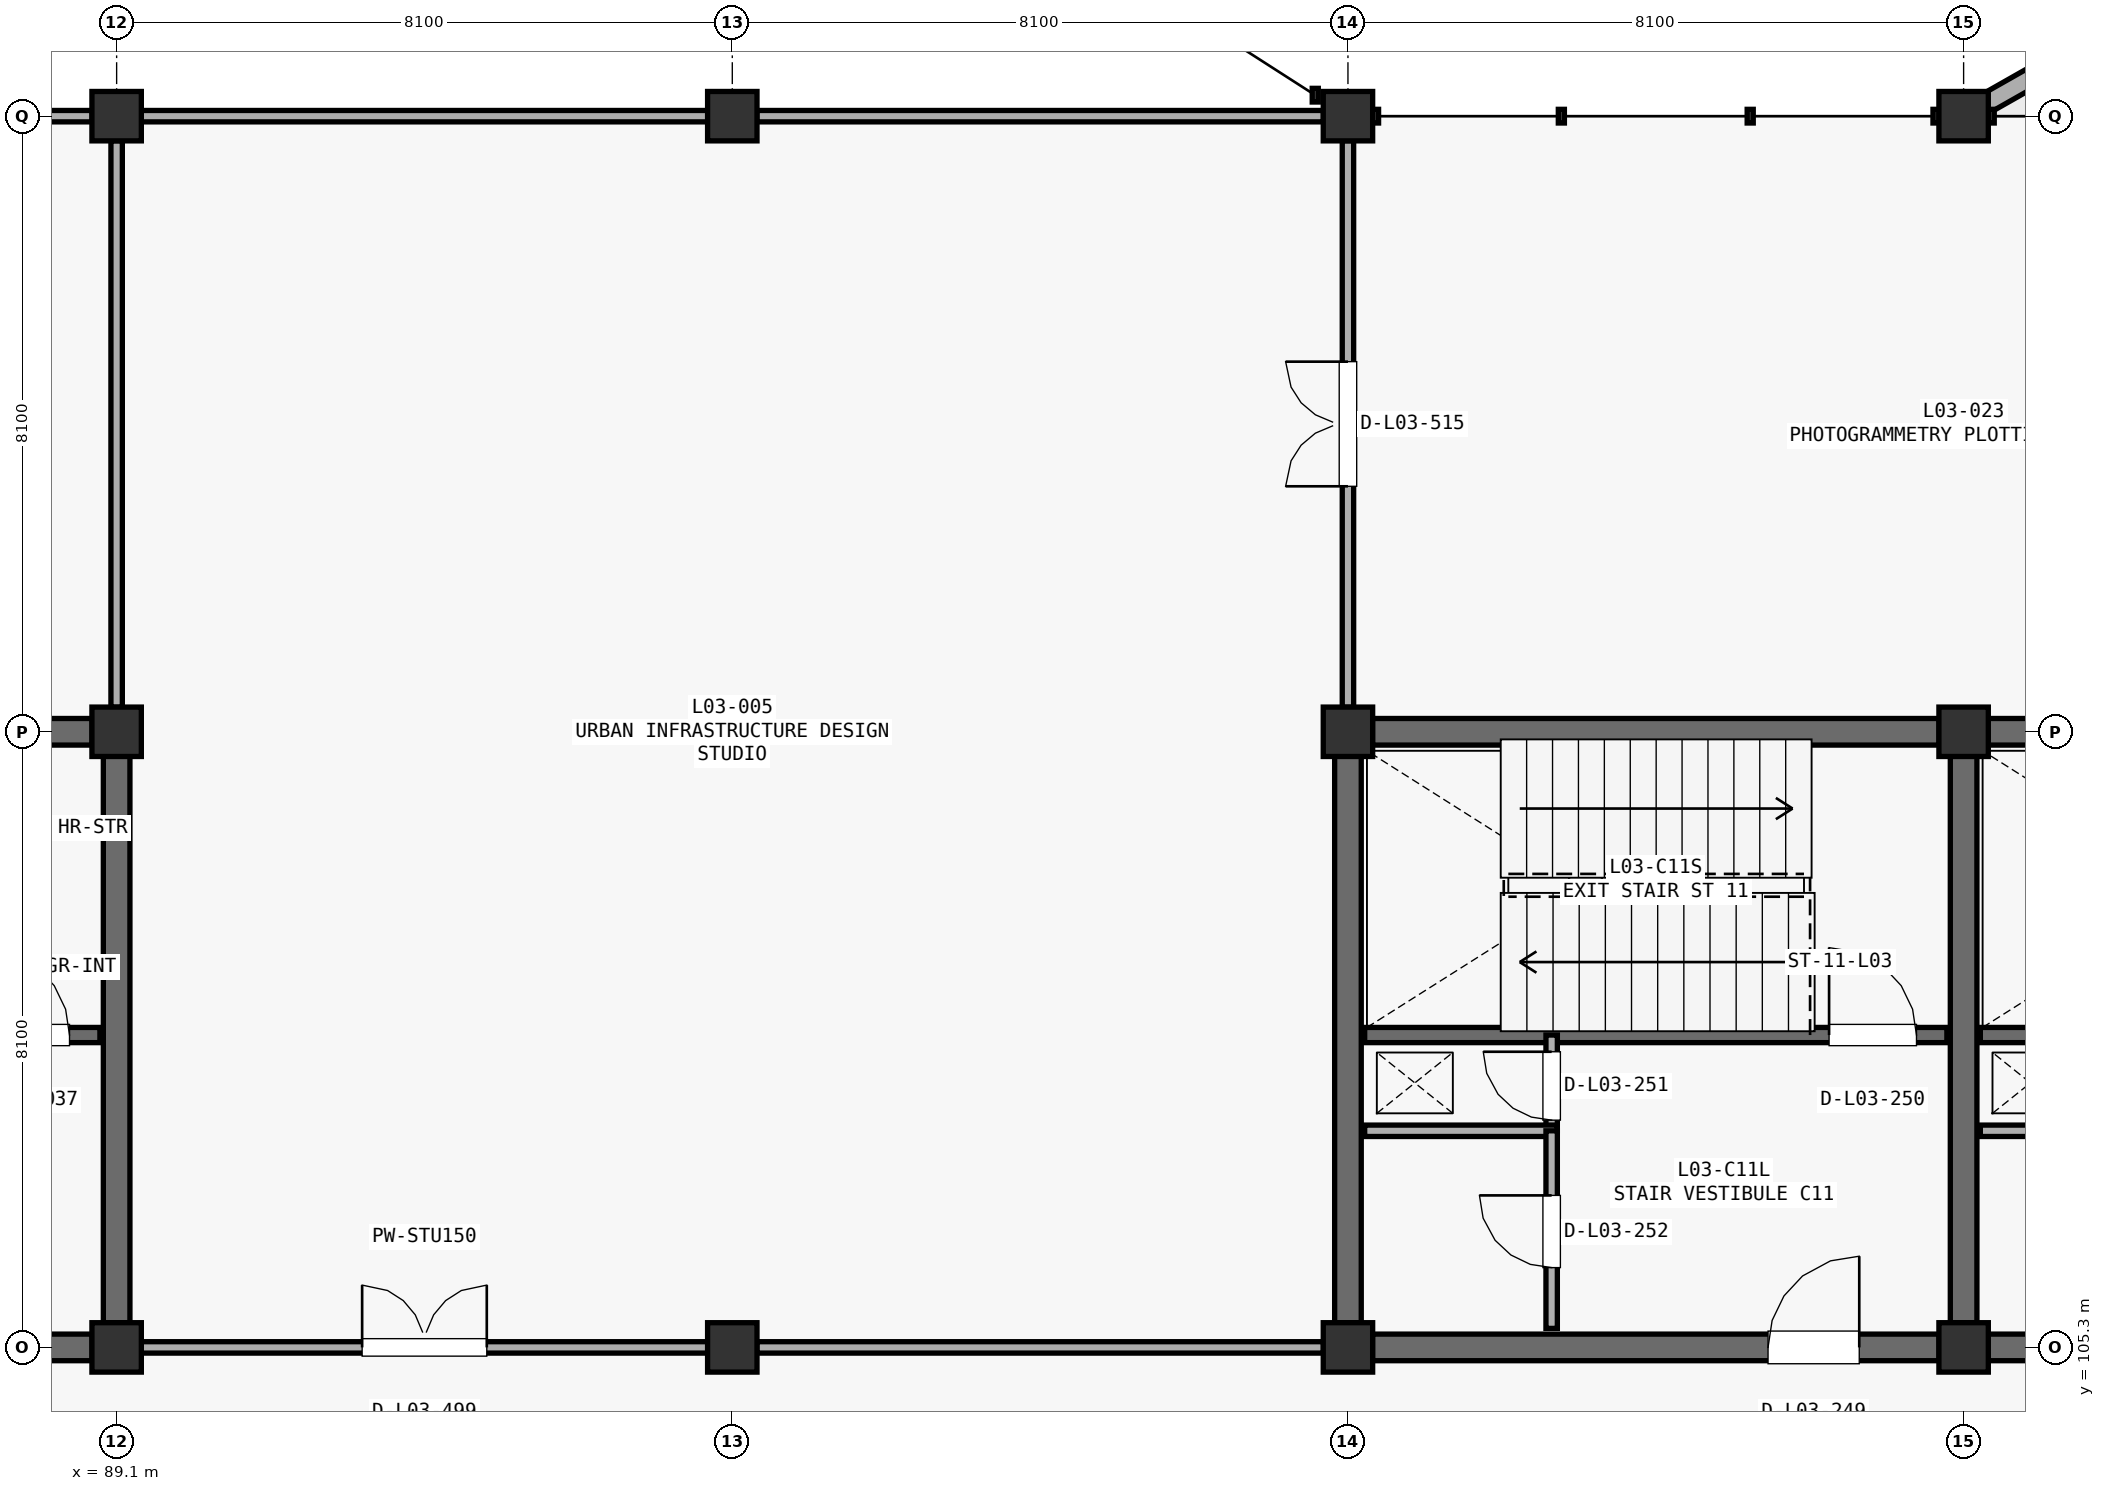
"""IFC4 building model, lengths in metres.
Left out: names, types, materials, properties, quantities, classifications, styles, units other than length and angle.
Written with IfcOpenShell. Run it as: python <this file> out.ifc"""

import sys

from ifc_helpers import new_model, si_unit, direction, frame, frame_2d, origin, origin_2d, place, context, subcontext, project, spatial, polyline, rectangle, outline, extrude, element, fill, save


model = new_model("IFC4")
c1 = context("Model", 3, precision=1e-05, world=origin(), true_north=direction((0.0, 1.0)))
c2 = subcontext(c1, "Body", "Model", "MODEL_VIEW")
j1 = project(units=[si_unit("LENGTHUNIT", "METRE"), si_unit("PLANEANGLEUNIT", "RADIAN")], contexts=[c1])
p1 = place(None, origin())
s1 = spatial("IfcSite", under=j1, at=p1, CompositionType="ELEMENT")
p2 = place(p1, origin())
s2 = spatial("IfcBuilding", under=s1, at=p2, CompositionType="ELEMENT")
p3 = place(p2, frame((0.0, 0.0, 14.11)))
s3 = spatial("IfcBuildingStorey", under=s2, at=p3, CompositionType="ELEMENT", Elevation=14.11)
for number, where, z_axis, x_axis in (
    (1, (89.1, 105.3, 0.0), (0.0, 0.0, 1.0), (1.0, 0.0, 0.0)),
    (2, (89.1, 113.4, 0.0), (0.0, 0.0, 1.0), (1.0, 0.0, 0.0)),
    (3, (89.1, 121.5, 0.0), (0.0, 0.0, 1.0), (1.0, 0.0, 0.0)),
    (4, (97.2, 105.3, 0.0), (0.0, 0.0, 1.0), (1.0, 0.0, 0.0)),
    (5, (97.2, 113.4, 0.0), (0.0, 0.0, 1.0), (1.0, 0.0, 0.0)),
    (6, (97.2, 121.5, 0.0), (0.0, 0.0, 1.0), (1.0, 0.0, 0.0)),
    (7, (105.3, 105.3, 0.0), (0.0, 0.0, 1.0), (1.0, 0.0, 0.0)),
    (8, (105.3, 113.4, 0.0), (0.0, 0.0, 1.0), (1.0, 0.0, 0.0)),
    (9, (105.3, 121.5, 0.0), (0.0, 0.0, 1.0), (1.0, 0.0, 0.0)),
    (10, (113.4, 105.3, 0.0), (0.0, 0.0, 1.0), (1.0, 0.0, 0.0)),
    (11, (113.4, 113.4, 0.0), (0.0, 0.0, 1.0), (1.0, 0.0, 0.0)),
    (12, (113.4, 121.5, 0.0), (0.0, 0.0, 1.0), (1.0, 0.0, 0.0)),
):
    element("IfcColumn", number, at=place(p3, frame(where, z_axis=z_axis, x_axis=x_axis)), inside=s3, PredefinedType="COLUMN", context=c2, shape_type="SweptSolid", body=[
        extrude(rectangle(XDim=0.65, YDim=0.65, at=origin_2d()), origin(), (0.0, 0.0, 1.0), 4.42),
    ])
p4 = place(p3, frame((113.417, 121.51, -0.35), z_axis=(0.0, 0.0, 1.0), x_axis=(0.86956831127, 0.49381266897, 0.0)))
e13 = element("IfcWall", 13, at=p4, inside=s3, PredefinedType="STANDARD", context=c2, shape_type="SweptSolid", body=[
    extrude(outline(polyline([(0.0, 0.0), (9.275, 0.0), (9.275, 2.21), (0.0, 0.36), (0.0, 0.0)])), frame((0.0, 0.13, 0.0), z_axis=(0.0, -1.0, 0.0), x_axis=(1.0, 0.0, 0.0)), (0.0, 0.0, 1.0), 0.26),
])
p5 = place(p3, frame((81.323, 113.4, 0.0), z_axis=(0.0, 0.0, 1.0), x_axis=(1.0, 0.0, 0.0)))
e14 = element("IfcWall", 14, at=p5, inside=s3, PredefinedType="SHEAR", context=c2, shape_type="SweptSolid", body=[
    extrude(rectangle(XDim=7.454, YDim=0.35, at=frame_2d((3.727, 0.0))), origin(), (0.0, 0.0, 1.0), 4.152),
])
p6 = place(p3, frame((89.1, 105.623, 0.0), z_axis=(0.0, 0.0, 1.0), x_axis=(0.0, 1.0, 0.0)))
e15 = element("IfcWall", 15, at=p6, inside=s3, PredefinedType="SHEAR", context=c2, shape_type="SweptSolid", body=[
    extrude(rectangle(XDim=7.454, YDim=0.35, at=frame_2d((3.727, 0.0))), origin(), (0.0, 0.0, 1.0), 4.152),
])
p7 = place(p3, frame((81.323, 105.3, 0.0), z_axis=(0.0, 0.0, 1.0), x_axis=(1.0, 0.0, 0.0)))
e16 = element("IfcWall", 16, at=p7, inside=s3, PredefinedType="SHEAR", context=c2, shape_type="SweptSolid", body=[
    extrude(rectangle(XDim=7.454, YDim=0.35, at=frame_2d((3.727, 0.0))), origin(), (0.0, 0.0, 1.0), 4.152),
])
p8 = place(p7, frame((5.204, 0.0, 0.0)))
e17 = element("IfcOpeningElement", 17, at=p8, cuts=e16, PredefinedType="OPENING", context=c2, shape_type="SweptSolid", body=[
    extrude(rectangle(XDim=1.2, YDim=2.2, at=frame_2d((0.6, 1.1))), frame((0.0, 0.185, 0.0), z_axis=(0.0, -1.0, 0.0), x_axis=(1.0, 0.0, 0.0)), (0.0, 0.0, 1.0), 0.37),
])
p9 = place(p3, frame((81.22, 109.41, 0.0), z_axis=(0.0, 0.0, 1.0), x_axis=(1.0, 0.0, 0.0)))
e18 = element("IfcWall", 18, at=p9, inside=s3, PredefinedType="SHEAR", context=c2, shape_type="SweptSolid", body=[
    extrude(rectangle(XDim=7.66, YDim=0.2, at=frame_2d((3.83, 0.0))), origin(), (0.0, 0.0, 1.0), 4.152),
])
p10 = place(p9, frame((6.11, 0.0, 0.0)))
e19 = element("IfcOpeningElement", 19, at=p10, cuts=e18, PredefinedType="OPENING", context=c2, shape_type="SweptSolid", body=[
    extrude(rectangle(XDim=1.15, YDim=2.2, at=frame_2d((0.575, 1.1))), frame((0.0, 0.11, 0.0), z_axis=(0.0, -1.0, 0.0), x_axis=(1.0, 0.0, 0.0)), (0.0, 0.0, 1.0), 0.22),
])
p11 = place(p3, frame((113.723, 113.4, 0.0), z_axis=(0.0, 0.0, 1.0), x_axis=(1.0, 0.0, 0.0)))
e20 = element("IfcWall", 20, at=p11, inside=s3, PredefinedType="SHEAR", context=c2, shape_type="SweptSolid", body=[
    extrude(rectangle(XDim=7.454, YDim=0.35, at=frame_2d((3.727, 0.0))), origin(), (0.0, 0.0, 1.0), 4.152),
])
p12 = place(p3, frame((113.4, 105.623, 0.0), z_axis=(0.0, 0.0, 1.0), x_axis=(0.0, 1.0, 0.0)))
e21 = element("IfcWall", 21, at=p12, inside=s3, PredefinedType="SHEAR", context=c2, shape_type="SweptSolid", body=[
    extrude(rectangle(XDim=7.454, YDim=0.35, at=frame_2d((3.727, 0.0))), origin(), (0.0, 0.0, 1.0), 4.152),
])
p13 = place(p3, frame((113.723, 105.3, 0.0), z_axis=(0.0, 0.0, 1.0), x_axis=(1.0, 0.0, 0.0)))
e22 = element("IfcWall", 22, at=p13, inside=s3, PredefinedType="SHEAR", context=c2, shape_type="SweptSolid", body=[
    extrude(rectangle(XDim=7.454, YDim=0.35, at=frame_2d((3.727, 0.0))), origin(), (0.0, 0.0, 1.0), 4.152),
])
p14 = place(p13, frame((5.204, 0.0, 0.0)))
e23 = element("IfcOpeningElement", 23, at=p14, cuts=e22, PredefinedType="OPENING", context=c2, shape_type="SweptSolid", body=[
    extrude(rectangle(XDim=1.2, YDim=2.2, at=frame_2d((0.6, 1.1))), frame((0.0, 0.185, 0.0), z_axis=(0.0, -1.0, 0.0), x_axis=(1.0, 0.0, 0.0)), (0.0, 0.0, 1.0), 0.37),
])
p15 = place(p3, frame((113.62, 109.41, 0.0), z_axis=(0.0, 0.0, 1.0), x_axis=(1.0, 0.0, 0.0)))
e24 = element("IfcWall", 24, at=p15, inside=s3, PredefinedType="SHEAR", context=c2, shape_type="SweptSolid", body=[
    extrude(rectangle(XDim=7.66, YDim=0.2, at=frame_2d((3.83, 0.0))), origin(), (0.0, 0.0, 1.0), 4.152),
])
p16 = place(p15, frame((6.11, 0.0, 0.0)))
e25 = element("IfcOpeningElement", 25, at=p16, cuts=e24, PredefinedType="OPENING", context=c2, shape_type="SweptSolid", body=[
    extrude(rectangle(XDim=1.15, YDim=2.2, at=frame_2d((0.575, 1.1))), frame((0.0, 0.11, 0.0), z_axis=(0.0, -1.0, 0.0), x_axis=(1.0, 0.0, 0.0)), (0.0, 0.0, 1.0), 0.22),
])
p17 = place(p3, frame((113.62, 108.15, 0.0), z_axis=(0.0, 0.0, 1.0), x_axis=(1.0, 0.0, 0.0)))
e26 = element("IfcWall", 26, at=p17, inside=s3, PredefinedType="PARTITIONING", context=c2, shape_type="SweptSolid", body=[
    extrude(rectangle(XDim=2.53, YDim=0.15, at=frame_2d((1.265, 0.0))), origin(), (0.0, 0.0, 1.0), 4.152),
])
for number, where, z_axis, x_axis in (
    (27, (105.623, 113.4, 0.0), (0.0, 0.0, 1.0), (1.0, 0.0, 0.0)),
    (28, (105.3, 105.623, 0.0), (0.0, 0.0, 1.0), (0.0, 1.0, 0.0)),
):
    element("IfcWall", number, at=place(p3, frame(where, z_axis=z_axis, x_axis=x_axis)), inside=s3, PredefinedType="SHEAR", context=c2, shape_type="SweptSolid", body=[
        extrude(rectangle(XDim=7.454, YDim=0.35, at=frame_2d((3.727, 0.0))), origin(), (0.0, 0.0, 1.0), 4.152),
    ])
p18 = place(p3, frame((105.623, 105.3, 0.0), z_axis=(0.0, 0.0, 1.0), x_axis=(1.0, 0.0, 0.0)))
e29 = element("IfcWall", 29, at=p18, inside=s3, PredefinedType="SHEAR", context=c2, shape_type="SweptSolid", body=[
    extrude(rectangle(XDim=7.454, YDim=0.35, at=frame_2d((3.727, 0.0))), origin(), (0.0, 0.0, 1.0), 4.152),
])
p19 = place(p18, frame((5.204, 0.0, 0.0)))
e30 = element("IfcOpeningElement", 30, at=p19, cuts=e29, PredefinedType="OPENING", context=c2, shape_type="SweptSolid", body=[
    extrude(rectangle(XDim=1.2, YDim=2.2, at=frame_2d((0.6, 1.1))), frame((0.0, 0.185, 0.0), z_axis=(0.0, -1.0, 0.0), x_axis=(1.0, 0.0, 0.0)), (0.0, 0.0, 1.0), 0.37),
])
p20 = place(p3, frame((105.52, 109.41, 0.0), z_axis=(0.0, 0.0, 1.0), x_axis=(1.0, 0.0, 0.0)))
e31 = element("IfcWall", 31, at=p20, inside=s3, PredefinedType="SHEAR", context=c2, shape_type="SweptSolid", body=[
    extrude(rectangle(XDim=7.66, YDim=0.2, at=frame_2d((3.83, 0.0))), origin(), (0.0, 0.0, 1.0), 4.152),
])
p21 = place(p20, frame((6.11, 0.0, 0.0)))
e32 = element("IfcOpeningElement", 32, at=p21, cuts=e31, PredefinedType="OPENING", context=c2, shape_type="SweptSolid", body=[
    extrude(rectangle(XDim=1.15, YDim=2.2, at=frame_2d((0.575, 1.1))), frame((0.0, 0.11, 0.0), z_axis=(0.0, -1.0, 0.0), x_axis=(1.0, 0.0, 0.0)), (0.0, 0.0, 1.0), 0.22),
])
p22 = place(p3, frame((107.98, 108.15, 0.0), z_axis=(0.0, 0.0, 1.0), x_axis=(0.0, 1.0, 0.0)))
e33 = element("IfcWall", 33, at=p22, inside=s3, PredefinedType="PARTITIONING", context=c2, shape_type="SweptSolid", body=[
    extrude(rectangle(XDim=1.26, YDim=0.15, at=frame_2d((0.63, 0.0))), origin(), (0.0, 0.0, 1.0), 4.152),
])
p23 = place(p22, frame((0.14, 0.0, 0.0)))
e34 = element("IfcOpeningElement", 34, at=p23, cuts=e33, PredefinedType="OPENING", context=c2, shape_type="SweptSolid", body=[
    extrude(rectangle(XDim=0.9, YDim=2.15, at=frame_2d((0.45, 1.075))), frame((0.0, 0.085, 0.0), z_axis=(0.0, -1.0, 0.0), x_axis=(1.0, 0.0, 0.0)), (0.0, 0.0, 1.0), 0.17),
])
p24 = place(p3, frame((105.52, 108.15, 0.0), z_axis=(0.0, 0.0, 1.0), x_axis=(1.0, 0.0, 0.0)))
e35 = element("IfcWall", 35, at=p24, inside=s3, PredefinedType="PARTITIONING", context=c2, shape_type="SweptSolid", body=[
    extrude(rectangle(XDim=2.53, YDim=0.15, at=frame_2d((1.265, 0.0))), origin(), (0.0, 0.0, 1.0), 4.152),
])
p25 = place(p3, frame((107.98, 105.55, 0.0), z_axis=(0.0, 0.0, 1.0), x_axis=(0.0, 1.0, 0.0)))
e36 = element("IfcWall", 36, at=p25, inside=s3, PredefinedType="PARTITIONING", context=c2, shape_type="SweptSolid", body=[
    extrude(rectangle(XDim=2.6, YDim=0.15, at=frame_2d((1.3, 0.0))), origin(), (0.0, 0.0, 1.0), 4.152),
])
p26 = place(p25, frame((0.8, 0.0, 0.0)))
e37 = element("IfcOpeningElement", 37, at=p26, cuts=e36, PredefinedType="OPENING", context=c2, shape_type="SweptSolid", body=[
    extrude(rectangle(XDim=0.95, YDim=2.15, at=frame_2d((0.475, 1.075))), frame((0.0, 0.085, 0.0), z_axis=(0.0, -1.0, 0.0), x_axis=(1.0, 0.0, 0.0)), (0.0, 0.0, 1.0), 0.17),
])
p27 = place(p3, frame((89.423, 105.3, 0.0), z_axis=(0.0, 0.0, 1.0), x_axis=(1.0, 0.0, 0.0)))
e38 = element("IfcWall", 38, at=p27, inside=s3, PredefinedType="PARTITIONING", context=c2, shape_type="SweptSolid", body=[
    extrude(rectangle(XDim=7.454, YDim=0.15, at=frame_2d((3.727, 0.0))), origin(), (0.0, 0.0, 1.0), 3.302),
])
p28 = place(p27, frame((2.907, 0.0, 0.0)))
e39 = element("IfcOpeningElement", 39, at=p28, cuts=e38, PredefinedType="OPENING", context=c2, shape_type="SweptSolid", body=[
    extrude(rectangle(XDim=1.64, YDim=2.25, at=frame_2d((0.82, 1.125))), frame((0.0, 0.085, 0.0), z_axis=(0.0, -1.0, 0.0), x_axis=(1.0, 0.0, 0.0)), (0.0, 0.0, 1.0), 0.17),
])
p29 = place(p3, frame((97.523, 105.3, 0.0), z_axis=(0.0, 0.0, 1.0), x_axis=(1.0, 0.0, 0.0)))
e40 = element("IfcWall", 40, at=p29, inside=s3, PredefinedType="PARTITIONING", context=c2, shape_type="SweptSolid", body=[
    extrude(rectangle(XDim=7.454, YDim=0.15, at=frame_2d((3.727, 0.0))), origin(), (0.0, 0.0, 1.0), 3.202),
])
p30 = place(p3, frame((105.3, 113.723, 0.0), z_axis=(0.0, 0.0, 1.0), x_axis=(0.0, 1.0, 0.0)))
e41 = element("IfcWall", 41, at=p30, inside=s3, PredefinedType="PARTITIONING", context=c2, shape_type="SweptSolid", body=[
    extrude(rectangle(XDim=7.454, YDim=0.15, at=frame_2d((3.727, 0.0))), origin(), (0.0, 0.0, 1.0), 3.202),
])
p31 = place(p30, frame((2.907, 0.0, 0.0)))
e42 = element("IfcOpeningElement", 42, at=p31, cuts=e41, PredefinedType="OPENING", context=c2, shape_type="SweptSolid", body=[
    extrude(rectangle(XDim=1.64, YDim=2.25, at=frame_2d((0.82, 1.125))), frame((0.0, 0.085, 0.0), z_axis=(0.0, -1.0, 0.0), x_axis=(1.0, 0.0, 0.0)), (0.0, 0.0, 1.0), 0.17),
])
p32 = place(p3, frame((89.1, 113.723, 0.0), z_axis=(0.0, 0.0, 1.0), x_axis=(0.0, 1.0, 0.0)))
e43 = element("IfcWall", 43, at=p32, inside=s3, PredefinedType="PARTITIONING", context=c2, shape_type="SweptSolid", body=[
    extrude(rectangle(XDim=7.454, YDim=0.15, at=frame_2d((3.727, 0.0))), origin(), (0.0, 0.0, 1.0), 3.402),
])
p33 = place(p3, frame((89.423, 121.5, 0.0), z_axis=(0.0, 0.0, 1.0), x_axis=(1.0, 0.0, 0.0)))
e44 = element("IfcWall", 44, at=p33, inside=s3, PredefinedType="PARTITIONING", context=c2, shape_type="SweptSolid", body=[
    extrude(rectangle(XDim=7.454, YDim=0.15, at=frame_2d((3.727, 0.0))), origin(), (0.0, 0.0, 1.0), 3.402),
])
p34 = place(p3, frame((97.523, 121.5, 0.0), z_axis=(0.0, 0.0, 1.0), x_axis=(1.0, 0.0, 0.0)))
e45 = element("IfcWall", 45, at=p34, inside=s3, PredefinedType="PARTITIONING", context=c2, shape_type="SweptSolid", body=[
    extrude(rectangle(XDim=7.454, YDim=0.15, at=frame_2d((3.727, 0.0))), origin(), (0.0, 0.0, 1.0), 3.502),
])
p35 = place(p3, frame((81.323, 121.5, 0.0), z_axis=(0.0, 0.0, 1.0), x_axis=(1.0, 0.0, 0.0)))
e46 = element("IfcWall", 46, at=p35, inside=s3, PredefinedType="PARTITIONING", context=c2, shape_type="SweptSolid", body=[
    extrude(rectangle(XDim=7.454, YDim=0.15, at=frame_2d((3.727, 0.0))), origin(), (0.0, 0.0, 1.0), 3.202),
])
p36 = place(p10, origin())
e47 = element("IfcDoor", 47, at=p36, inside=s3, OperationType="SINGLE_SWING_LEFT", PredefinedType="DOOR", context=c2, shape_type="SweptSolid", body=[
    extrude(rectangle(XDim=1.15, YDim=2.2, at=frame_2d((0.575, 1.1))), frame((0.0, 0.025, 0.0), z_axis=(0.0, -1.0, 0.0), x_axis=(1.0, 0.0, 0.0)), (0.0, 0.0, 1.0), 0.05),
])
fill(e19, e47)
p37 = place(p19, origin())
e48 = element("IfcDoor", 48, at=p37, inside=s3, OperationType="SINGLE_SWING_RIGHT", PredefinedType="DOOR", context=c2, shape_type="SweptSolid", body=[
    extrude(rectangle(XDim=1.2, YDim=2.2, at=frame_2d((0.6, 1.1))), frame((0.0, 0.025, 0.0), z_axis=(0.0, -1.0, 0.0), x_axis=(1.0, 0.0, 0.0)), (0.0, 0.0, 1.0), 0.05),
])
fill(e30, e48)
p38 = place(p21, origin())
e49 = element("IfcDoor", 49, at=p38, inside=s3, OperationType="SINGLE_SWING_LEFT", PredefinedType="DOOR", context=c2, shape_type="SweptSolid", body=[
    extrude(rectangle(XDim=1.15, YDim=2.2, at=frame_2d((0.575, 1.1))), frame((0.0, 0.025, 0.0), z_axis=(0.0, -1.0, 0.0), x_axis=(1.0, 0.0, 0.0)), (0.0, 0.0, 1.0), 0.05),
])
fill(e32, e49)
p39 = place(p23, origin())
e50 = element("IfcDoor", 50, at=p39, inside=s3, OperationType="SINGLE_SWING_RIGHT", PredefinedType="DOOR", context=c2, shape_type="SweptSolid", body=[
    extrude(rectangle(XDim=0.9, YDim=2.15, at=frame_2d((0.45, 1.075))), frame((0.0, 0.025, 0.0), z_axis=(0.0, -1.0, 0.0), x_axis=(1.0, 0.0, 0.0)), (0.0, 0.0, 1.0), 0.05),
])
fill(e34, e50)
p40 = place(p26, origin())
e51 = element("IfcDoor", 51, at=p40, inside=s3, OperationType="SINGLE_SWING_RIGHT", PredefinedType="DOOR", context=c2, shape_type="SweptSolid", body=[
    extrude(rectangle(XDim=0.95, YDim=2.15, at=frame_2d((0.475, 1.075))), frame((0.0, 0.025, 0.0), z_axis=(0.0, -1.0, 0.0), x_axis=(1.0, 0.0, 0.0)), (0.0, 0.0, 1.0), 0.05),
])
fill(e37, e51)
p41 = place(p28, origin())
e52 = element("IfcDoor", 52, at=p41, inside=s3, OperationType="DOUBLE_SWING_LEFT", PredefinedType="DOOR", context=c2, shape_type="SweptSolid", body=[
    extrude(rectangle(XDim=1.64, YDim=2.25, at=frame_2d((0.82, 1.125))), frame((0.0, 0.025, 0.0), z_axis=(0.0, -1.0, 0.0), x_axis=(1.0, 0.0, 0.0)), (0.0, 0.0, 1.0), 0.05),
])
fill(e39, e52)
p42 = place(p31, origin())
e53 = element("IfcDoor", 53, at=p42, inside=s3, OperationType="DOUBLE_SWING_LEFT", PredefinedType="DOOR", context=c2, shape_type="SweptSolid", body=[
    extrude(rectangle(XDim=1.64, YDim=2.25, at=frame_2d((0.82, 1.125))), frame((0.0, 0.025, 0.0), z_axis=(0.0, -1.0, 0.0), x_axis=(1.0, 0.0, 0.0)), (0.0, 0.0, 1.0), 0.05),
])
fill(e42, e53)
save(model, sys.argv[1])
